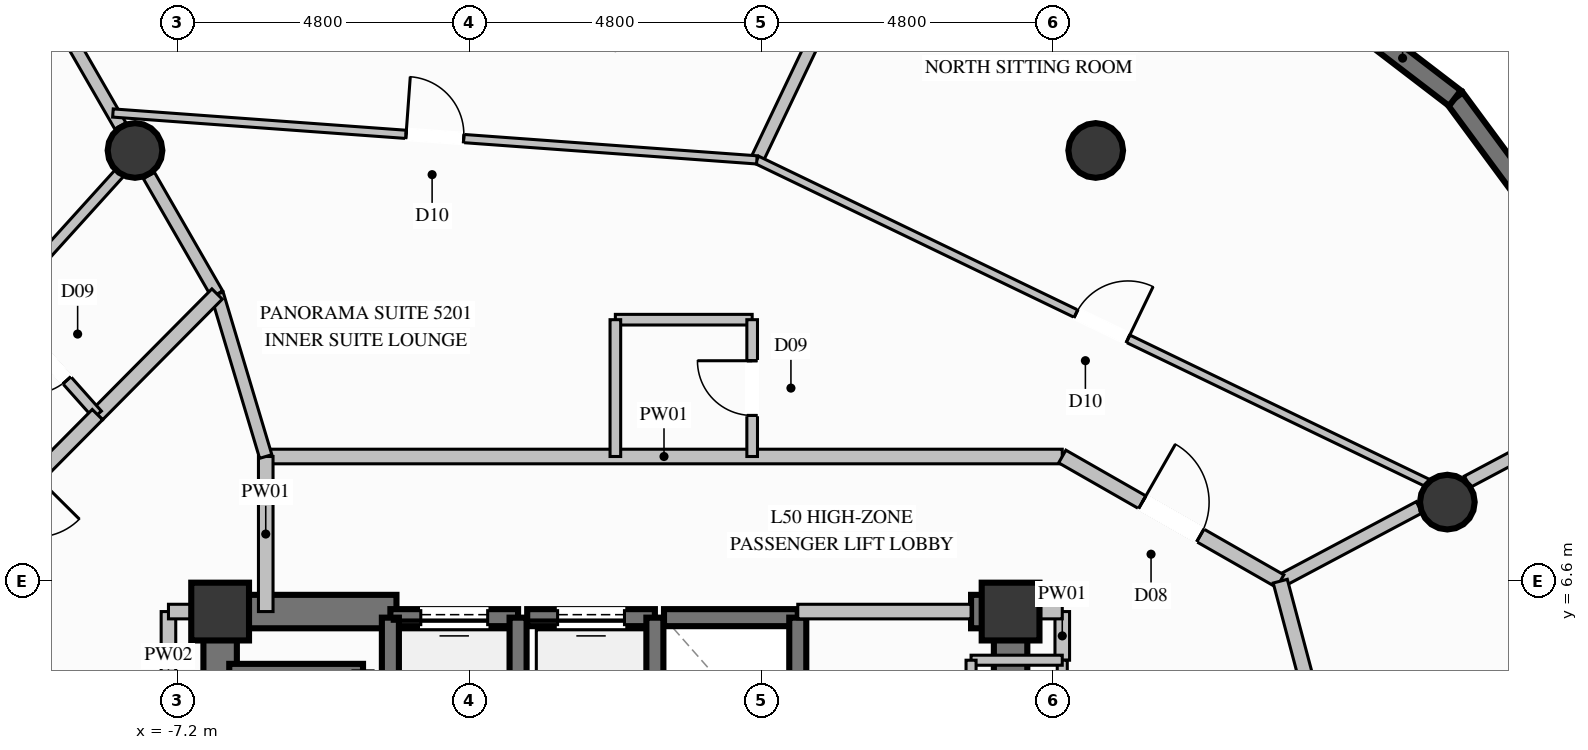
"""IFC4 building model, lengths in metres.
Left out: names, types, materials, properties, quantities, classifications, styles, units other than length and angle.
Written with IfcOpenShell. Run it as: python <this file> out.ifc"""

import sys

from ifc_helpers import new_model, si_unit, direction, frame, frame_2d, origin, origin_2d, place, context, subcontext, project, spatial, rectangle, circle, extrude, element, fill, save


model = new_model("IFC4")
c1 = context("Model", 3, precision=1e-05, world=origin(), true_north=direction((0.0, 1.0)))
c2 = subcontext(c1, "Body", "Model", "MODEL_VIEW")
j1 = project(units=[si_unit("LENGTHUNIT", "METRE"), si_unit("PLANEANGLEUNIT", "RADIAN")], contexts=[c1])
p1 = place(None, origin())
s1 = spatial("IfcSite", under=j1, at=p1, CompositionType="ELEMENT")
p2 = place(p1, origin())
s2 = spatial("IfcBuilding", under=s1, at=p2, CompositionType="ELEMENT")
p3 = place(p2, frame((0.0, 0.0, 194.8)))
s3 = spatial("IfcBuildingStorey", under=s2, at=p3, CompositionType="ELEMENT", Elevation=194.8)
for number, where, z_axis, x_axis in (
    (1, (6.5, 6.1, 0.0), (0.0, 0.0, 1.0), (1.0, 0.0, 0.0)),
    (2, (-6.5, 6.1, 0.0), (0.0, 0.0, 1.0), (1.0, 0.0, 0.0)),
):
    element("IfcColumn", number, at=place(p3, frame(where, z_axis=z_axis, x_axis=x_axis)), inside=s3, PredefinedType="COLUMN", context=c2, shape_type="SweptSolid", body=[
        extrude(rectangle(XDim=0.95, YDim=0.95, at=origin_2d()), origin(), (0.0, 0.0, 1.0), 3.6),
    ])
p4 = place(p3, frame((-6.225, 6.1, 0.0), z_axis=(0.0, 0.0, 1.0), x_axis=(1.0, 0.0, 0.0)))
e3 = element("IfcWall", 3, at=p4, inside=s3, PredefinedType="SHEAR", context=c2, shape_type="SweptSolid", body=[
    extrude(rectangle(XDim=2.625, YDim=0.55, at=frame_2d((1.312, 0.0))), origin(), (0.0, 0.0, 1.0), 3.6),
])
p5 = place(p3, frame((5.85, 6.1, 0.0), z_axis=(0.0, 0.0, 1.0), x_axis=(1.0, 0.0, 0.0)))
e4 = element("IfcWall", 4, at=p5, inside=s3, PredefinedType="SHEAR", context=c2, shape_type="SweptSolid", body=[
    extrude(rectangle(XDim=0.375, YDim=0.55, at=frame_2d((0.188, 0.0))), origin(), (0.0, 0.0, 1.0), 3.6),
])
p6 = place(p3, frame((-6.5, 2.35, 0.0), z_axis=(0.0, 0.0, 1.0), x_axis=(0.0, 1.0, 0.0)))
e5 = element("IfcWall", 5, at=p6, inside=s3, PredefinedType="SHEAR", context=c2, shape_type="SweptSolid", body=[
    extrude(rectangle(XDim=4.025, YDim=0.55, at=frame_2d((2.012, 0.0))), origin(), (0.0, 0.0, 1.0), 3.6),
])
p7 = place(p3, frame((6.5, 3.35, 0.0), z_axis=(0.0, 0.0, 1.0), x_axis=(0.0, 1.0, 0.0)))
e6 = element("IfcWall", 6, at=p7, inside=s3, PredefinedType="SHEAR", context=c2, shape_type="SweptSolid", body=[
    extrude(rectangle(XDim=3.025, YDim=0.55, at=frame_2d((1.512, 0.0))), origin(), (0.0, 0.0, 1.0), 3.6),
])
for number, where, z_axis, x_axis in (
    (7, (13.683, 7.9, 0.0), (0.0, 0.0, 1.0), (1.0, 0.0, 0.0)),
    (8, (7.9, 13.683, 0.0), (0.0, 0.0, 1.0), (1.0, 0.0, 0.0)),
    (9, (-7.9, 13.683, 0.0), (0.0, 0.0, 1.0), (1.0, 0.0, 0.0)),
):
    element("IfcColumn", number, at=place(p3, frame(where, z_axis=z_axis, x_axis=x_axis)), inside=s3, PredefinedType="COLUMN", context=c2, shape_type="SweptSolid", body=[
        extrude(circle(Radius=0.45, at=origin_2d()), origin(), (0.0, 0.0, 1.0), 3.6),
    ])
p8 = place(p3, frame((13.808, 14.542, 0.0), z_axis=(0.0, 0.0, 1.0), x_axis=(0.593903316121, -0.804536419996, 0.0)))
e10 = element("IfcWall", 10, at=p8, inside=s3, PredefinedType="SOLIDWALL", context=c2, shape_type="SweptSolid", body=[
    extrude(rectangle(XDim=6.785, YDim=0.32, at=frame_2d((3.393, 0.0))), origin(), (0.0, 0.0, 1.0), 3.36),
])
p9 = place(p8, frame((1.911, 0.0, 0.35)))
e11 = element("IfcOpeningElement", 11, at=p9, cuts=e10, PredefinedType="OPENING", context=c2, shape_type="SweptSolid", body=[
    extrude(rectangle(XDim=1.8, YDim=2.6, at=frame_2d((0.9, 1.3))), frame((0.0, 0.17, 0.0), z_axis=(0.0, -1.0, 0.0), x_axis=(1.0, 0.0, 0.0)), (0.0, 0.0, 1.0), 0.34),
])
p10 = place(p3, frame((8.539, 18.577, 0.0), z_axis=(0.0, 0.0, 1.0), x_axis=(0.793947286628, -0.607986600227, 0.0)))
e12 = element("IfcWall", 12, at=p10, inside=s3, PredefinedType="SOLIDWALL", context=c2, shape_type="SweptSolid", body=[
    extrude(rectangle(XDim=6.636, YDim=0.32, at=frame_2d((3.318, 0.0))), origin(), (0.0, 0.0, 1.0), 3.36),
])
p11 = place(p10, frame((2.418, 0.0, 0.35)))
e13 = element("IfcOpeningElement", 13, at=p11, cuts=e12, PredefinedType="OPENING", context=c2, shape_type="SweptSolid", body=[
    extrude(rectangle(XDim=1.8, YDim=2.6, at=frame_2d((0.9, 1.3))), frame((0.0, 0.17, 0.0), z_axis=(0.0, -1.0, 0.0), x_axis=(1.0, 0.0, 0.0)), (0.0, 0.0, 1.0), 0.34),
])
p12 = place(p3, frame((-1.6, 6.0, 0.0), z_axis=(0.0, 0.0, 1.0), x_axis=(-1.0, 0.0, 0.0)))
e14 = element("IfcWall", 14, at=p12, inside=s3, PredefinedType="SOLIDWALL", context=c2, shape_type="SweptSolid", body=[
    extrude(rectangle(XDim=2.1, YDim=0.28, at=frame_2d((1.05, 0.0))), origin(), (0.0, 0.0, 1.0), 3.36),
])
p13 = place(p12, frame((0.5, 0.0, 0.0)))
e15 = element("IfcOpeningElement", 15, at=p13, cuts=e14, PredefinedType="OPENING", context=c2, shape_type="SweptSolid", body=[
    extrude(rectangle(XDim=1.1, YDim=2.2, at=frame_2d((0.55, 1.1))), frame((0.0, 0.15, 0.0), z_axis=(0.0, -1.0, 0.0), x_axis=(1.0, 0.0, 0.0)), (0.0, 0.0, 1.0), 0.3),
])
for number, where, z_axis, x_axis in (
    (16, (-3.7, 6.0, 0.0), (0.0, 0.0, 1.0), (0.0, -1.0, 0.0)),
    (17, (-1.6, 3.5, 0.0), (0.0, 0.0, 1.0), (0.0, 1.0, 0.0)),
):
    element("IfcWall", number, at=place(p3, frame(where, z_axis=z_axis, x_axis=x_axis)), inside=s3, PredefinedType="SOLIDWALL", context=c2, shape_type="SweptSolid", body=[
        extrude(rectangle(XDim=2.5, YDim=0.28, at=frame_2d((1.25, 0.0))), origin(), (0.0, 0.0, 1.0), 3.36),
    ])
p14 = place(p3, frame((0.65, 6.0, 0.0), z_axis=(0.0, 0.0, 1.0), x_axis=(-1.0, 0.0, 0.0)))
e18 = element("IfcWall", 18, at=p14, inside=s3, PredefinedType="SOLIDWALL", context=c2, shape_type="SweptSolid", body=[
    extrude(rectangle(XDim=2.1, YDim=0.28, at=frame_2d((1.05, 0.0))), origin(), (0.0, 0.0, 1.0), 3.36),
])
p15 = place(p14, frame((0.5, 0.0, 0.0)))
e19 = element("IfcOpeningElement", 19, at=p15, cuts=e18, PredefinedType="OPENING", context=c2, shape_type="SweptSolid", body=[
    extrude(rectangle(XDim=1.1, YDim=2.2, at=frame_2d((0.55, 1.1))), frame((0.0, 0.15, 0.0), z_axis=(0.0, -1.0, 0.0), x_axis=(1.0, 0.0, 0.0)), (0.0, 0.0, 1.0), 0.3),
])
p16 = place(p3, frame((0.65, 3.5, 0.0), z_axis=(0.0, 0.0, 1.0), x_axis=(0.0, 1.0, 0.0)))
e20 = element("IfcWall", 20, at=p16, inside=s3, PredefinedType="SOLIDWALL", context=c2, shape_type="SweptSolid", body=[
    extrude(rectangle(XDim=2.5, YDim=0.28, at=frame_2d((1.25, 0.0))), origin(), (0.0, 0.0, 1.0), 3.36),
])
p17 = place(p3, frame((3.0, 6.0, 0.0), z_axis=(0.0, 0.0, 1.0), x_axis=(-1.0, 0.0, 0.0)))
e21 = element("IfcWall", 21, at=p17, inside=s3, PredefinedType="SOLIDWALL", context=c2, shape_type="SweptSolid", body=[
    extrude(rectangle(XDim=2.2, YDim=0.28, at=frame_2d((1.1, 0.0))), origin(), (0.0, 0.0, 1.0), 3.36),
])
p18 = place(p3, frame((3.0, 3.5, 0.0), z_axis=(0.0, 0.0, 1.0), x_axis=(0.0, 1.0, 0.0)))
e22 = element("IfcWall", 22, at=p18, inside=s3, PredefinedType="SOLIDWALL", context=c2, shape_type="SweptSolid", body=[
    extrude(rectangle(XDim=2.5, YDim=0.28, at=frame_2d((1.25, 0.0))), origin(), (0.0, 0.0, 1.0), 3.36),
])
p19 = place(p3, frame((-4.15, 5.1, 0.0), z_axis=(0.0, 0.0, 1.0), x_axis=(-1.0, 0.0, 0.0)))
e23 = element("IfcWall", 23, at=p19, inside=s3, PredefinedType="SOLIDWALL", context=c2, shape_type="SweptSolid", body=[
    extrude(rectangle(XDim=2.2, YDim=0.28, at=frame_2d((1.1, 0.0))), origin(), (0.0, 0.0, 1.0), 3.36),
])
p20 = place(p3, frame((-5.75, 8.65, 0.0), z_axis=(0.0, 0.0, 1.0), x_axis=(1.0, 0.0, 0.0)))
e24 = element("IfcWall", 24, at=p20, inside=s3, PredefinedType="PARTITIONING", context=c2, shape_type="SweptSolid", body=[
    extrude(rectangle(XDim=13.1, YDim=0.24, at=frame_2d((6.55, 0.0))), origin(), (0.0, 0.0, 1.0), 3.36),
])
p21 = place(p3, frame((3.0, 6.1, 0.0), z_axis=(0.0, 0.0, 1.0), x_axis=(1.0, 0.0, 0.0)))
e25 = element("IfcWall", 25, at=p21, inside=s3, PredefinedType="PARTITIONING", context=c2, shape_type="SweptSolid", body=[
    extrude(rectangle(XDim=2.85, YDim=0.24, at=frame_2d((1.425, 0.0))), origin(), (0.0, 0.0, 1.0), 2.445),
])
p22 = place(p3, frame((7.35, 5.3, 0.0), z_axis=(0.0, 0.0, 1.0), x_axis=(0.0, 1.0, 0.0)))
e26 = element("IfcWall", 26, at=p22, inside=s3, PredefinedType="PARTITIONING", context=c2, shape_type="SweptSolid", body=[
    extrude(rectangle(XDim=0.8, YDim=0.24, at=frame_2d((0.4, 0.0))), origin(), (0.0, 0.0, 1.0), 2.445),
])
p23 = place(p3, frame((6.5, 6.1, 0.0), z_axis=(0.0, 0.0, 1.0), x_axis=(1.0, 0.0, 0.0)))
e27 = element("IfcWall", 27, at=p23, inside=s3, PredefinedType="PARTITIONING", context=c2, shape_type="SweptSolid", body=[
    extrude(rectangle(XDim=0.85, YDim=0.24, at=frame_2d((0.425, 0.0))), origin(), (0.0, 0.0, 1.0), 2.801),
])
p24 = place(p3, frame((-5.75, 6.1, 0.0), z_axis=(0.0, 0.0, 1.0), x_axis=(0.0, 1.0, 0.0)))
e28 = element("IfcWall", 28, at=p24, inside=s3, PredefinedType="PARTITIONING", context=c2, shape_type="SweptSolid", body=[
    extrude(rectangle(XDim=2.55, YDim=0.24, at=frame_2d((1.275, 0.0))), origin(), (0.0, 0.0, 1.0), 3.36),
])
p25 = place(p3, frame((-7.35, 4.95, 0.0), z_axis=(0.0, 0.0, 1.0), x_axis=(0.0, 1.0, 0.0)))
e29 = element("IfcWall", 29, at=p25, inside=s3, PredefinedType="PARTITIONING", context=c2, shape_type="SweptSolid", body=[
    extrude(rectangle(XDim=1.15, YDim=0.24, at=frame_2d((0.575, 0.0))), origin(), (0.0, 0.0, 1.0), 2.445),
])
p26 = place(p3, frame((-7.35, 6.1, 0.0), z_axis=(0.0, 0.0, 1.0), x_axis=(1.0, 0.0, 0.0)))
e30 = element("IfcWall", 30, at=p26, inside=s3, PredefinedType="PARTITIONING", context=c2, shape_type="SweptSolid", body=[
    extrude(rectangle(XDim=0.85, YDim=0.24, at=frame_2d((0.425, 0.0))), origin(), (0.0, 0.0, 1.0), 2.801),
])
p27 = place(p3, frame((7.35, 2.75, 0.0), z_axis=(0.0, 0.0, 1.0), x_axis=(0.0, 1.0, 0.0)))
e31 = element("IfcWall", 31, at=p27, inside=s3, PredefinedType="PARTITIONING", context=c2, shape_type="SweptSolid", body=[
    extrude(rectangle(XDim=2.55, YDim=0.165, at=frame_2d((1.275, 0.0))), origin(), (0.0, 0.0, 1.0), 3.36),
])
p28 = place(p27, frame((0.8, 0.0, 0.0)))
e32 = element("IfcOpeningElement", 32, at=p28, cuts=e31, PredefinedType="OPENING", context=c2, shape_type="SweptSolid", body=[
    extrude(rectangle(XDim=0.95, YDim=2.1, at=frame_2d((0.475, 1.05))), frame((0.0, 0.093, 0.0), z_axis=(0.0, -1.0, 0.0), x_axis=(1.0, 0.0, 0.0)), (0.0, 0.0, 1.0), 0.185),
])
p29 = place(p3, frame((7.35, 5.3, 0.0), z_axis=(0.0, 0.0, 1.0), x_axis=(-1.0, 0.0, 0.0)))
e33 = element("IfcWall", 33, at=p29, inside=s3, PredefinedType="PARTITIONING", context=c2, shape_type="SweptSolid", body=[
    extrude(rectangle(XDim=1.5, YDim=0.165, at=frame_2d((0.75, 0.0))), origin(), (0.0, 0.0, 1.0), 2.445),
])
p30 = place(p3, frame((5.85, 5.3, 0.0), z_axis=(0.0, 0.0, 1.0), x_axis=(0.0, -1.0, 0.0)))
e34 = element("IfcWall", 34, at=p30, inside=s3, PredefinedType="PARTITIONING", context=c2, shape_type="SweptSolid", body=[
    extrude(rectangle(XDim=2.55, YDim=0.165, at=frame_2d((1.275, 0.0))), origin(), (0.0, 0.0, 1.0), 2.445),
])
p31 = place(p3, frame((10.935, 6.6, 0.0), z_axis=(0.0, 0.0, 1.0), x_axis=(0.883041221412, 0.469295430711, 0.0)))
e35 = element("IfcWall", 35, at=p31, inside=s3, PredefinedType="PARTITIONING", context=c2, shape_type="SweptSolid", body=[
    extrude(rectangle(XDim=2.589, YDim=0.21, at=frame_2d((1.294, 0.0))), origin(), (0.0, 0.0, 1.0), 2.801),
])
p32 = place(p3, frame((14.012, 8.235, 0.0), z_axis=(0.0, 0.0, 1.0), x_axis=(0.883108656971, 0.469168519813, 0.0)))
e36 = element("IfcWall", 36, at=p32, inside=s3, PredefinedType="PARTITIONING", context=c2, shape_type="SweptSolid", body=[
    extrude(rectangle(XDim=3.581, YDim=0.21, at=frame_2d((1.79, 0.0))), origin(), (0.0, 0.0, 1.0), 3.36),
])
p33 = place(p3, frame((-6.55, 11.322, 0.0), z_axis=(0.0, 0.0, 1.0), x_axis=(-0.498754501597, 0.866743299447, 0.0)))
e37 = element("IfcWall", 37, at=p33, inside=s3, PredefinedType="PARTITIONING", context=c2, shape_type="SweptSolid", body=[
    extrude(rectangle(XDim=2.25, YDim=0.21, at=frame_2d((1.125, 0.0))), origin(), (0.0, 0.0, 1.0), 2.801),
])
p34 = place(p3, frame((-8.141, 14.087, 0.0), z_axis=(0.0, 0.0, 1.0), x_axis=(-0.498750239611, 0.866745751929, 0.0)))
e38 = element("IfcWall", 38, at=p34, inside=s3, PredefinedType="PARTITIONING", context=c2, shape_type="SweptSolid", body=[
    extrude(rectangle(XDim=4.617, YDim=0.21, at=frame_2d((2.309, 0.0))), origin(), (0.0, 0.0, 1.0), 3.36),
])
for number, where, z_axis, x_axis in (
    (39, (0.0, 10.9, 0.0), (0.0, 0.0, 1.0), (1.0, 0.0, 0.0)),
    (40, (0.0, 10.9, 0.0), (0.0, 0.0, 1.0), (0.0, -1.0, 0.0)),
):
    element("IfcWall", number, at=place(p3, frame(where, z_axis=z_axis, x_axis=x_axis)), inside=s3, PredefinedType="PLUMBINGWALL", context=c2, shape_type="SweptSolid", body=[
        extrude(rectangle(XDim=2.25, YDim=0.175, at=frame_2d((1.125, 0.0))), origin(), (0.0, 0.0, 1.0), 3.36),
    ])
p35 = place(p3, frame((2.25, 8.65, 0.0), z_axis=(0.0, 0.0, 1.0), x_axis=(0.0, 1.0, 0.0)))
e41 = element("IfcWall", 41, at=p35, inside=s3, PredefinedType="PLUMBINGWALL", context=c2, shape_type="SweptSolid", body=[
    extrude(rectangle(XDim=2.25, YDim=0.175, at=frame_2d((1.125, 0.0))), origin(), (0.0, 0.0, 1.0), 3.36),
])
p36 = place(p35, frame((0.675, 0.0, 0.0)))
e42 = element("IfcOpeningElement", 42, at=p36, cuts=e41, PredefinedType="OPENING", context=c2, shape_type="SweptSolid", body=[
    extrude(rectangle(XDim=0.9, YDim=2.1, at=frame_2d((0.45, 1.05))), frame((0.0, 0.098, 0.0), z_axis=(0.0, -1.0, 0.0), x_axis=(1.0, 0.0, 0.0)), (0.0, 0.0, 1.0), 0.195),
])
p37 = place(p3, frame((-6.55, 11.322, 0.0), z_axis=(0.0, 0.0, 1.0), x_axis=(0.286825893059, -0.957982727961, 0.0)))
e43 = element("IfcWall", 43, at=p37, inside=s3, PredefinedType="PARTITIONING", context=c2, shape_type="SweptSolid", body=[
    extrude(rectangle(XDim=2.789, YDim=0.21, at=frame_2d((1.395, 0.0))), origin(), (0.0, 0.0, 1.0), 3.36),
])
p38 = place(p3, frame((7.35, 8.65, 0.0), z_axis=(0.0, 0.0, 1.0), x_axis=(0.868112139229, -0.496368123193, 0.0)))
e44 = element("IfcWall", 44, at=p38, inside=s3, PredefinedType="PARTITIONING", context=c2, shape_type="SweptSolid", body=[
    extrude(rectangle(XDim=4.13, YDim=0.24, at=frame_2d((2.065, 0.0))), origin(), (0.0, 0.0, 1.0), 3.36),
])
p39 = place(p38, frame((1.515, 0.0, 0.0)))
e45 = element("IfcOpeningElement", 45, at=p39, cuts=e44, PredefinedType="OPENING", context=c2, shape_type="SweptSolid", body=[
    extrude(rectangle(XDim=1.1, YDim=2.3, at=frame_2d((0.55, 1.15))), frame((0.0, 0.13, 0.0), z_axis=(0.0, -1.0, 0.0), x_axis=(1.0, 0.0, 0.0)), (0.0, 0.0, 1.0), 0.26),
])
p40 = place(p3, frame((2.327, 13.528, 0.0), z_axis=(0.0, 0.0, 1.0), x_axis=(0.430585057704, 0.902550003093, 0.0)))
e46 = element("IfcWall", 46, at=p40, inside=s3, PredefinedType="PARTITIONING", context=c2, shape_type="SweptSolid", body=[
    extrude(rectangle(XDim=6.879, YDim=0.21, at=frame_2d((3.44, 0.0))), origin(), (0.0, 0.0, 1.0), 3.36),
])
p41 = place(p3, frame((2.327, 13.528, 0.0), z_axis=(0.0, 0.0, 1.0), x_axis=(0.900917232422, -0.433990944981, 0.0)))
e47 = element("IfcWall", 47, at=p41, inside=s3, PredefinedType="PARTITIONING", context=c2, shape_type="SweptSolid", body=[
    extrude(rectangle(XDim=12.602, YDim=0.135, at=frame_2d((6.301, 0.0))), origin(), (0.0, 0.0, 1.0), 2.929),
])
p42 = place(p41, frame((5.826, 0.0, 0.0)))
e48 = element("IfcOpeningElement", 48, at=p42, cuts=e47, PredefinedType="OPENING", context=c2, shape_type="SweptSolid", body=[
    extrude(rectangle(XDim=0.95, YDim=2.1, at=frame_2d((0.475, 1.05))), frame((0.0, 0.078, 0.0), z_axis=(0.0, -1.0, 0.0), x_axis=(1.0, 0.0, 0.0)), (0.0, 0.0, 1.0), 0.155),
])
p43 = place(p3, frame((-8.263, 14.299, 0.0), z_axis=(0.0, 0.0, 1.0), x_axis=(0.997360188486, -0.072613045814, 0.0)))
e49 = element("IfcWall", 49, at=p43, inside=s3, PredefinedType="PARTITIONING", context=c2, shape_type="SweptSolid", body=[
    extrude(rectangle(XDim=10.618, YDim=0.135, at=frame_2d((5.309, 0.0))), origin(), (0.0, 0.0, 1.0), 2.929),
])
p44 = place(p43, frame((4.834, 0.0, 0.0)))
e50 = element("IfcOpeningElement", 50, at=p44, cuts=e49, PredefinedType="OPENING", context=c2, shape_type="SweptSolid", body=[
    extrude(rectangle(XDim=0.95, YDim=2.1, at=frame_2d((0.475, 1.05))), frame((0.0, 0.078, 0.0), z_axis=(0.0, -1.0, 0.0), x_axis=(1.0, 0.0, 0.0)), (0.0, 0.0, 1.0), 0.155),
])
p45 = place(p3, frame((-6.55, 11.322, 0.0), z_axis=(0.0, 0.0, 1.0), x_axis=(-0.704436417235, -0.709767098472, 0.0)))
e51 = element("IfcWall", 51, at=p45, inside=s3, PredefinedType="PARTITIONING", context=c2, shape_type="SweptSolid", body=[
    extrude(rectangle(XDim=2.794, YDim=0.24, at=frame_2d((1.397, 0.0))), origin(), (0.0, 0.0, 1.0), 3.36),
])
p46 = place(p3, frame((-7.874, 13.623, 0.0), z_axis=(0.0, 0.0, 1.0), x_axis=(-0.670980131946, -0.741475328338, 0.0)))
e52 = element("IfcWall", 52, at=p46, inside=s3, PredefinedType="PLUMBINGWALL", context=c2, shape_type="SweptSolid", body=[
    extrude(rectangle(XDim=3.349, YDim=0.175, at=frame_2d((1.674, 0.0))), origin(), (0.0, 0.0, 1.0), 2.929),
])
p47 = place(p3, frame((-8.518, 9.339, 0.0), z_axis=(0.0, 0.0, 1.0), x_axis=(-0.66490420922, 0.746928639538, 0.0)))
e53 = element("IfcWall", 53, at=p47, inside=s3, PredefinedType="PLUMBINGWALL", context=c2, shape_type="SweptSolid", body=[
    extrude(rectangle(XDim=2.411, YDim=0.175, at=frame_2d((1.206, 0.0))), origin(), (0.0, 0.0, 1.0), 3.36),
])
p48 = place(p47, frame((0.756, 0.0, 0.0)))
e54 = element("IfcOpeningElement", 54, at=p48, cuts=e53, PredefinedType="OPENING", context=c2, shape_type="SweptSolid", body=[
    extrude(rectangle(XDim=0.9, YDim=2.1, at=frame_2d((0.45, 1.05))), frame((0.0, 0.098, 0.0), z_axis=(0.0, -1.0, 0.0), x_axis=(1.0, 0.0, 0.0)), (0.0, 0.0, 1.0), 0.195),
])
p49 = place(p3, frame((-8.518, 9.339, 0.0), z_axis=(0.0, 0.0, 1.0), x_axis=(-0.7042534056, -0.70994868878, 0.0)))
e55 = element("IfcWall", 55, at=p49, inside=s3, PredefinedType="PARTITIONING", context=c2, shape_type="SweptSolid", body=[
    extrude(rectangle(XDim=3.858, YDim=0.24, at=frame_2d((1.929, 0.0))), origin(), (0.0, 0.0, 1.0), 3.36),
])
p50 = place(p49, frame((1.429, 0.0, 0.0)))
e56 = element("IfcOpeningElement", 56, at=p50, cuts=e55, PredefinedType="OPENING", context=c2, shape_type="SweptSolid", body=[
    extrude(rectangle(XDim=1.0, YDim=2.2, at=frame_2d((0.5, 1.1))), frame((0.0, 0.13, 0.0), z_axis=(0.0, -1.0, 0.0), x_axis=(1.0, 0.0, 0.0)), (0.0, 0.0, 1.0), 0.26),
])
p51 = place(p3, frame((12.65, 0.15, 0.0), z_axis=(0.0, 0.0, 1.0), x_axis=(-0.256934024047, 0.966428945804, 0.0)))
e57 = element("IfcWall", 57, at=p51, inside=s3, PredefinedType="PARTITIONING", context=c2, shape_type="SweptSolid", body=[
    extrude(rectangle(XDim=6.674, YDim=0.24, at=frame_2d((3.337, 0.0))), origin(), (0.0, 0.0, 1.0), 3.36),
])
p52 = place(p13, origin())
e58 = element("IfcDoor", 58, at=p52, inside=s3, OperationType="SLIDING_TO_LEFT", PredefinedType="DOOR", context=c2, shape_type="SweptSolid", body=[
    extrude(rectangle(XDim=1.1, YDim=2.2, at=frame_2d((0.55, 1.1))), frame((0.0, 0.025, 0.0), z_axis=(0.0, -1.0, 0.0), x_axis=(1.0, 0.0, 0.0)), (0.0, 0.0, 1.0), 0.05),
])
fill(e15, e58)
p53 = place(p15, origin())
e59 = element("IfcDoor", 59, at=p53, inside=s3, OperationType="SLIDING_TO_LEFT", PredefinedType="DOOR", context=c2, shape_type="SweptSolid", body=[
    extrude(rectangle(XDim=1.1, YDim=2.2, at=frame_2d((0.55, 1.1))), frame((0.0, 0.025, 0.0), z_axis=(0.0, -1.0, 0.0), x_axis=(1.0, 0.0, 0.0)), (0.0, 0.0, 1.0), 0.05),
])
fill(e19, e59)
p54 = place(p36, origin())
e60 = element("IfcDoor", 60, at=p54, inside=s3, OperationType="SINGLE_SWING_RIGHT", PredefinedType="DOOR", context=c2, shape_type="SweptSolid", body=[
    extrude(rectangle(XDim=0.9, YDim=2.1, at=frame_2d((0.45, 1.05))), frame((0.0, 0.025, 0.0), z_axis=(0.0, -1.0, 0.0), x_axis=(1.0, 0.0, 0.0)), (0.0, 0.0, 1.0), 0.05),
])
fill(e42, e60)
p55 = place(p39, origin())
e61 = element("IfcDoor", 61, at=p55, inside=s3, OperationType="SINGLE_SWING_LEFT", PredefinedType="DOOR", context=c2, shape_type="SweptSolid", body=[
    extrude(rectangle(XDim=1.1, YDim=2.3, at=frame_2d((0.55, 1.15))), frame((0.0, 0.025, 0.0), z_axis=(0.0, -1.0, 0.0), x_axis=(1.0, 0.0, 0.0)), (0.0, 0.0, 1.0), 0.05),
])
fill(e45, e61)
p56 = place(p42, origin())
e62 = element("IfcDoor", 62, at=p56, inside=s3, OperationType="SINGLE_SWING_RIGHT", PredefinedType="DOOR", context=c2, shape_type="SweptSolid", body=[
    extrude(rectangle(XDim=0.95, YDim=2.1, at=frame_2d((0.475, 1.05))), frame((0.0, 0.025, 0.0), z_axis=(0.0, -1.0, 0.0), x_axis=(1.0, 0.0, 0.0)), (0.0, 0.0, 1.0), 0.05),
])
fill(e48, e62)
p57 = place(p44, origin())
e63 = element("IfcDoor", 63, at=p57, inside=s3, OperationType="SINGLE_SWING_LEFT", PredefinedType="DOOR", context=c2, shape_type="SweptSolid", body=[
    extrude(rectangle(XDim=0.95, YDim=2.1, at=frame_2d((0.475, 1.05))), frame((0.0, 0.025, 0.0), z_axis=(0.0, -1.0, 0.0), x_axis=(1.0, 0.0, 0.0)), (0.0, 0.0, 1.0), 0.05),
])
fill(e50, e63)
p58 = place(p48, origin())
e64 = element("IfcDoor", 64, at=p58, inside=s3, OperationType="SINGLE_SWING_RIGHT", PredefinedType="DOOR", context=c2, shape_type="SweptSolid", body=[
    extrude(rectangle(XDim=0.9, YDim=2.1, at=frame_2d((0.45, 1.05))), frame((0.0, 0.025, 0.0), z_axis=(0.0, -1.0, 0.0), x_axis=(1.0, 0.0, 0.0)), (0.0, 0.0, 1.0), 0.05),
])
fill(e54, e64)
save(model, sys.argv[1])
